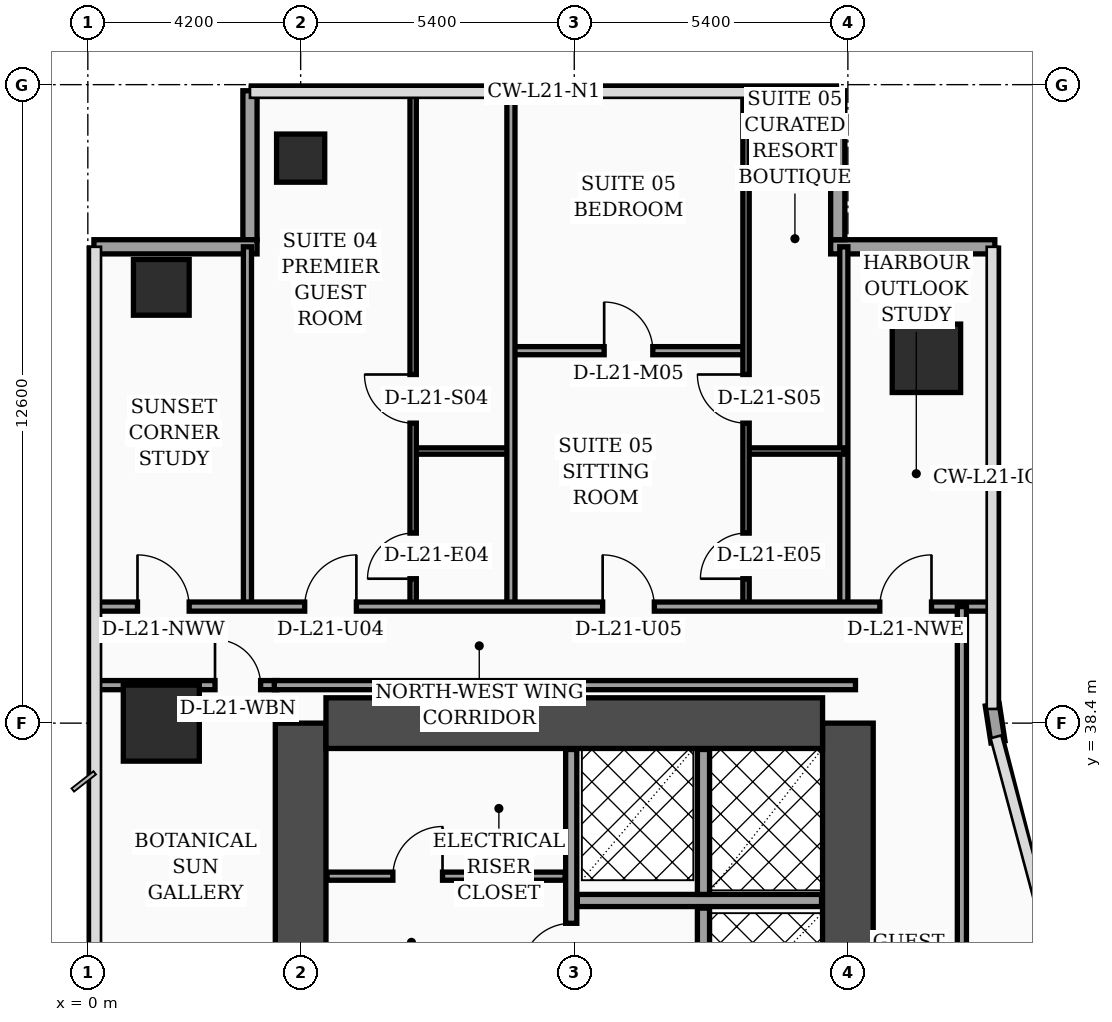
"""IFC4 building model, lengths in metres.
Left out: names, types, materials, properties, quantities, classifications, styles, units other than length and angle.
Written with IfcOpenShell. Run it as: python <this file> out.ifc"""

import sys

from ifc_helpers import new_model, si_unit, direction, frame, frame_2d, origin, origin_2d, place, context, subcontext, project, spatial, rectangle, hollow_rectangle, extrude, element, fill, save


model = new_model("IFC4")
c1 = context("Model", 3, precision=1e-05, world=origin(), true_north=direction((0.0, 1.0)))
c2 = subcontext(c1, "Body", "Model", "MODEL_VIEW")
j1 = project(units=[si_unit("LENGTHUNIT", "METRE"), si_unit("PLANEANGLEUNIT", "RADIAN")], contexts=[c1])
p1 = place(None, origin())
s1 = spatial("IfcSite", under=j1, at=p1, CompositionType="ELEMENT")
p2 = place(p1, origin())
s2 = spatial("IfcBuilding", under=s1, at=p2, CompositionType="ELEMENT")
p3 = place(p2, frame((0.0, 0.0, 88.8)))
s3 = spatial("IfcBuildingStorey", under=s2, at=p3, CompositionType="ELEMENT", Elevation=88.8)
p4 = place(p3, frame((4.2, 16.8, 0.0), z_axis=(0.0, 0.0, 1.0), x_axis=(0.0, 1.0, 0.0)))
e1 = element("IfcWall", 1, at=p4, inside=s3, PredefinedType="SHEAR", context=c2, shape_type="SweptSolid", body=[
    extrude(rectangle(XDim=21.6, YDim=1.0, at=frame_2d((10.8, 0.0))), origin(), (0.0, 0.0, 1.0), 3.52),
])
p5 = place(p3, frame((15.0, 16.8, 0.0), z_axis=(0.0, 0.0, 1.0), x_axis=(0.0, 1.0, 0.0)))
e2 = element("IfcWall", 2, at=p5, inside=s3, PredefinedType="SHEAR", context=c2, shape_type="SweptSolid", body=[
    extrude(rectangle(XDim=21.6, YDim=1.0, at=frame_2d((10.8, 0.0))), origin(), (0.0, 0.0, 1.0), 3.52),
])
p6 = place(p5, frame((8.65, 0.0, 0.0)))
e3 = element("IfcOpeningElement", 3, at=p6, cuts=e2, PredefinedType="OPENING", context=c2, shape_type="SweptSolid", body=[
    extrude(rectangle(XDim=1.1, YDim=2.2, at=frame_2d((0.55, 1.1))), frame((0.0, 0.51, 0.0), z_axis=(0.0, -1.0, 0.0), x_axis=(1.0, 0.0, 0.0)), (0.0, 0.0, 1.0), 1.02),
])
p7 = place(p5, frame((1.25, 0.0, 0.0)))
e4 = element("IfcOpeningElement", 4, at=p7, cuts=e2, PredefinedType="OPENING", context=c2, shape_type="SweptSolid", body=[
    extrude(rectangle(XDim=1.1, YDim=2.2, at=frame_2d((0.55, 1.1))), frame((0.0, 0.51, 0.0), z_axis=(0.0, -1.0, 0.0), x_axis=(1.0, 0.0, 0.0)), (0.0, 0.0, 1.0), 1.02),
])
p8 = place(p5, frame((3.8, 0.0, 0.0)))
e5 = element("IfcOpeningElement", 5, at=p8, cuts=e2, PredefinedType="OPENING", context=c2, shape_type="SweptSolid", body=[
    extrude(rectangle(XDim=1.1, YDim=2.2, at=frame_2d((0.55, 1.1))), frame((0.0, 0.51, 0.0), z_axis=(0.0, -1.0, 0.0), x_axis=(1.0, 0.0, 0.0)), (0.0, 0.0, 1.0), 1.02),
])
p9 = place(p5, frame((6.35, 0.0, 0.0)))
e6 = element("IfcOpeningElement", 6, at=p9, cuts=e2, PredefinedType="OPENING", context=c2, shape_type="SweptSolid", body=[
    extrude(rectangle(XDim=1.1, YDim=2.2, at=frame_2d((0.55, 1.1))), frame((0.0, 0.51, 0.0), z_axis=(0.0, -1.0, 0.0), x_axis=(1.0, 0.0, 0.0)), (0.0, 0.0, 1.0), 1.02),
])
p10 = place(p3, frame((4.7, 38.4, 0.0), z_axis=(0.0, 0.0, 1.0), x_axis=(1.0, 0.0, 0.0)))
e7 = element("IfcWall", 7, at=p10, inside=s3, PredefinedType="SHEAR", context=c2, shape_type="SweptSolid", body=[
    extrude(rectangle(XDim=9.8, YDim=1.0, at=frame_2d((4.9, 0.0))), origin(), (0.0, 0.0, 1.0), 3.52),
])
p11 = place(p3, frame((1.45, 38.4, 0.0), z_axis=(0.0, 0.0, 1.0), x_axis=(1.0, 0.0, 0.0)))
e8 = element("IfcColumn", 8, at=p11, inside=s3, PredefinedType="COLUMN", context=c2, shape_type="SweptSolid", body=[
    extrude(rectangle(XDim=1.5, YDim=1.5, at=origin_2d()), origin(), (0.0, 0.0, 1.0), 3.52),
])
p12 = place(p3, frame((1.45, 47.0, 0.0), z_axis=(0.0, 0.0, 1.0), x_axis=(1.0, 0.0, 0.0)))
e9 = element("IfcColumn", 9, at=p12, inside=s3, PredefinedType="COLUMN", context=c2, shape_type="SweptSolid", body=[
    extrude(hollow_rectangle(XDim=1.1, YDim=1.1, WallThickness=0.045, at=origin_2d()), origin(), (0.0, 0.0, 1.0), 3.52),
])
p13 = place(p3, frame((4.2, 49.55, 0.0), z_axis=(0.0, 0.0, 1.0), x_axis=(1.0, 0.0, 0.0)))
e10 = element("IfcColumn", 10, at=p13, inside=s3, PredefinedType="COLUMN", context=c2, shape_type="SweptSolid", body=[
    extrude(hollow_rectangle(XDim=0.95, YDim=0.95, WallThickness=0.04, at=origin_2d()), origin(), (0.0, 0.0, 1.0), 3.52),
])
p14 = place(p3, frame((16.55, 45.6, 0.0), z_axis=(0.0, 0.0, 1.0), x_axis=(1.0, 0.0, 0.0)))
e11 = element("IfcColumn", 11, at=p14, inside=s3, PredefinedType="COLUMN", context=c2, shape_type="SweptSolid", body=[
    extrude(rectangle(XDim=1.35, YDim=1.35, at=origin_2d()), origin(), (0.0, 0.0, 1.0), 3.52),
])
p15 = place(p3, frame((17.962, 38.03, 0.0), z_axis=(0.0, 0.0, 1.0), x_axis=(-0.15141125477, 0.988470855377, 0.0)))
e12 = element("IfcWall", 12, at=p15, inside=s3, PredefinedType="SOLIDWALL", context=c2, shape_type="SweptSolid", body=[
    extrude(rectangle(XDim=0.739, YDim=0.28, at=frame_2d((0.369, 0.0))), origin(), (0.0, 0.0, 1.0), 3.52),
])
p16 = place(p3, frame((17.9, 47.8, 0.0), z_axis=(0.0, 0.0, 1.0), x_axis=(-1.0, 0.0, 0.0)))
e13 = element("IfcWall", 13, at=p16, inside=s3, PredefinedType="SOLIDWALL", context=c2, shape_type="SweptSolid", body=[
    extrude(rectangle(XDim=3.24, YDim=0.28, at=frame_2d((1.62, 0.0))), origin(), (0.0, 0.0, 1.0), 3.52),
])
p17 = place(p3, frame((14.8, 47.94, 0.0), z_axis=(0.0, 0.0, 1.0), x_axis=(0.0, 1.0, 0.0)))
e14 = element("IfcWall", 14, at=p17, inside=s3, PredefinedType="SOLIDWALL", context=c2, shape_type="SweptSolid", body=[
    extrude(rectangle(XDim=2.94, YDim=0.28, at=frame_2d((1.47, 0.0))), origin(), (0.0, 0.0, 1.0), 3.52),
])
p18 = place(p3, frame((3.2, 50.88, 0.0), z_axis=(0.0, 0.0, 1.0), x_axis=(0.0, -1.0, 0.0)))
e15 = element("IfcWall", 15, at=p18, inside=s3, PredefinedType="SOLIDWALL", context=c2, shape_type="SweptSolid", body=[
    extrude(rectangle(XDim=2.94, YDim=0.28, at=frame_2d((1.47, 0.0))), origin(), (0.0, 0.0, 1.0), 3.02),
])
p19 = place(p3, frame((3.34, 47.8, 0.0), z_axis=(0.0, 0.0, 1.0), x_axis=(-1.0, 0.0, 0.0)))
e16 = element("IfcWall", 16, at=p19, inside=s3, PredefinedType="SOLIDWALL", context=c2, shape_type="SweptSolid", body=[
    extrude(rectangle(XDim=3.22, YDim=0.28, at=frame_2d((1.61, 0.0))), origin(), (0.0, 0.0, 1.0), 3.02),
])
p20 = place(p3, frame((4.72, 35.38, 0.0), z_axis=(0.0, 0.0, 1.0), x_axis=(1.0, 0.0, 0.0)))
e17 = element("IfcWall", 17, at=p20, inside=s3, PredefinedType="PARTITIONING", context=c2, shape_type="SweptSolid", body=[
    extrude(rectangle(XDim=4.7, YDim=0.16, at=frame_2d((2.35, 0.0))), origin(), (0.0, 0.0, 1.0), 3.52),
])
p21 = place(p20, frame((1.3, 0.0, 0.0)))
e18 = element("IfcOpeningElement", 18, at=p21, cuts=e17, PredefinedType="OPENING", context=c2, shape_type="SweptSolid", body=[
    extrude(rectangle(XDim=0.98, YDim=2.15, at=frame_2d((0.49, 1.075))), frame((0.0, 0.09, 0.0), z_axis=(0.0, -1.0, 0.0), x_axis=(1.0, 0.0, 0.0)), (0.0, 0.0, 1.0), 0.18),
])
p22 = place(p3, frame((9.54, 32.92, 0.0), z_axis=(0.0, 0.0, 1.0), x_axis=(0.0, 1.0, 0.0)))
e19 = element("IfcWall", 19, at=p22, inside=s3, PredefinedType="SOLIDWALL", context=c2, shape_type="SweptSolid", body=[
    extrude(rectangle(XDim=4.96, YDim=0.22, at=frame_2d((2.48, 0.0))), origin(), (0.0, 0.0, 1.0), 3.52),
])
p23 = place(p22, frame((0.55, 0.0, 0.0)))
e20 = element("IfcOpeningElement", 20, at=p23, cuts=e19, PredefinedType="OPENING", context=c2, shape_type="SweptSolid", body=[
    extrude(rectangle(XDim=0.98, YDim=2.15, at=frame_2d((0.49, 1.075))), frame((0.0, 0.12, 0.0), z_axis=(0.0, -1.0, 0.0), x_axis=(1.0, 0.0, 0.0)), (0.0, 0.0, 1.0), 0.24),
])
p24 = place(p3, frame((12.15, 27.0, 0.0), z_axis=(0.0, 0.0, 1.0), x_axis=(0.0, 1.0, 0.0)))
e21 = element("IfcWall", 21, at=p24, inside=s3, PredefinedType="SOLIDWALL", context=c2, shape_type="SweptSolid", body=[
    extrude(rectangle(XDim=7.75, YDim=0.24, at=frame_2d((3.875, 0.0))), origin(), (0.0, 0.0, 1.0), 3.52),
])
p25 = place(p3, frame((9.66, 34.9, 0.0), z_axis=(0.0, 0.0, 1.0), x_axis=(1.0, 0.0, 0.0)))
e22 = element("IfcWall", 22, at=p25, inside=s3, PredefinedType="SOLIDWALL", context=c2, shape_type="SweptSolid", body=[
    extrude(rectangle(XDim=4.82, YDim=0.24, at=frame_2d((2.41, 0.0))), origin(), (0.0, 0.0, 1.0), 3.52),
])
p26 = place(p3, frame((12.15, 35.02, 0.0), z_axis=(0.0, 0.0, 1.0), x_axis=(0.0, 1.0, 0.0)))
e23 = element("IfcWall", 23, at=p26, inside=s3, PredefinedType="SOLIDWALL", context=c2, shape_type="SweptSolid", body=[
    extrude(rectangle(XDim=2.86, YDim=0.24, at=frame_2d((1.43, 0.0))), origin(), (0.0, 0.0, 1.0), 3.52),
])
p27 = place(p3, frame((0.08, 39.15, 0.0), z_axis=(0.0, 0.0, 1.0), x_axis=(1.0, 0.0, 0.0)))
e24 = element("IfcWall", 24, at=p27, inside=s3, PredefinedType="PARTITIONING", context=c2, shape_type="SweptSolid", body=[
    extrude(rectangle(XDim=3.65, YDim=0.18, at=frame_2d((1.825, 0.0))), origin(), (0.0, 0.0, 1.0), 2.82),
])
p28 = place(p27, frame((2.43, 0.0, 0.0)))
e25 = element("IfcOpeningElement", 25, at=p28, cuts=e24, PredefinedType="OPENING", context=c2, shape_type="SweptSolid", body=[
    extrude(rectangle(XDim=0.9, YDim=2.15, at=frame_2d((0.45, 1.075))), frame((0.0, 0.1, 0.0), z_axis=(0.0, -1.0, 0.0), x_axis=(1.0, 0.0, 0.0)), (0.0, 0.0, 1.0), 0.2),
])
p29 = place(p3, frame((3.15, 40.7, 0.0), z_axis=(0.0, 0.0, 1.0), x_axis=(0.0, 1.0, 0.0)))
e26 = element("IfcWall", 26, at=p29, inside=s3, PredefinedType="PARTITIONING", context=c2, shape_type="SweptSolid", body=[
    extrude(rectangle(XDim=7.1, YDim=0.16, at=frame_2d((3.55, 0.0))), origin(), (0.0, 0.0, 1.0), 3.12),
])
p30 = place(p3, frame((14.92, 40.7, 0.0), z_axis=(0.0, 0.0, 1.0), x_axis=(0.0, 1.0, 0.0)))
e27 = element("IfcWall", 27, at=p30, inside=s3, PredefinedType="PARTITIONING", context=c2, shape_type="SweptSolid", body=[
    extrude(rectangle(XDim=7.1, YDim=0.16, at=frame_2d((3.55, 0.0))), origin(), (0.0, 0.0, 1.0), 3.02),
])
p31 = place(p3, frame((6.42, 43.77, 0.0), z_axis=(0.0, 0.0, 1.0), x_axis=(1.0, 0.0, 0.0)))
e28 = element("IfcWall", 28, at=p31, inside=s3, PredefinedType="PARTITIONING", context=c2, shape_type="SweptSolid", body=[
    extrude(rectangle(XDim=1.93, YDim=0.125, at=frame_2d((0.965, 0.0))), origin(), (0.0, 0.0, 1.0), 3.52),
])
p32 = place(p3, frame((6.42, 40.7, 0.0), z_axis=(0.0, 0.0, 1.0), x_axis=(0.0, 1.0, 0.0)))
e29 = element("IfcWall", 29, at=p32, inside=s3, PredefinedType="PARTITIONING", context=c2, shape_type="SweptSolid", body=[
    extrude(rectangle(XDim=10.24, YDim=0.125, at=frame_2d((5.12, 0.0))), origin(), (0.0, 0.0, 1.0), 3.02),
])
p33 = place(p32, frame((0.55, 0.0, 0.0)))
e30 = element("IfcOpeningElement", 30, at=p33, cuts=e29, PredefinedType="OPENING", context=c2, shape_type="SweptSolid", body=[
    extrude(rectangle(XDim=0.9, YDim=2.15, at=frame_2d((0.45, 1.075))), frame((0.0, 0.073, 0.0), z_axis=(0.0, -1.0, 0.0), x_axis=(1.0, 0.0, 0.0)), (0.0, 0.0, 1.0), 0.145),
])
p34 = place(p32, frame((3.62, 0.0, 0.0)))
e31 = element("IfcOpeningElement", 31, at=p34, cuts=e29, PredefinedType="OPENING", context=c2, shape_type="SweptSolid", body=[
    extrude(rectangle(XDim=0.96, YDim=2.2, at=frame_2d((0.48, 1.1))), frame((0.0, 0.073, 0.0), z_axis=(0.0, -1.0, 0.0), x_axis=(1.0, 0.0, 0.0)), (0.0, 0.0, 1.0), 0.145),
])
p35 = place(p3, frame((12.99, 43.77, 0.0), z_axis=(0.0, 0.0, 1.0), x_axis=(1.0, 0.0, 0.0)))
e32 = element("IfcWall", 32, at=p35, inside=s3, PredefinedType="PARTITIONING", context=c2, shape_type="SweptSolid", body=[
    extrude(rectangle(XDim=1.93, YDim=0.125, at=frame_2d((0.965, 0.0))), origin(), (0.0, 0.0, 1.0), 3.52),
])
p36 = place(p3, frame((8.35, 45.75, 0.0), z_axis=(0.0, 0.0, 1.0), x_axis=(1.0, 0.0, 0.0)))
e33 = element("IfcWall", 33, at=p36, inside=s3, PredefinedType="PARTITIONING", context=c2, shape_type="SweptSolid", body=[
    extrude(rectangle(XDim=4.64, YDim=0.16, at=frame_2d((2.32, 0.0))), origin(), (0.0, 0.0, 1.0), 3.52),
])
p37 = place(p36, frame((1.84, 0.0, 0.0)))
e34 = element("IfcOpeningElement", 34, at=p37, cuts=e33, PredefinedType="OPENING", context=c2, shape_type="SweptSolid", body=[
    extrude(rectangle(XDim=0.96, YDim=2.2, at=frame_2d((0.48, 1.1))), frame((0.0, 0.09, 0.0), z_axis=(0.0, -1.0, 0.0), x_axis=(1.0, 0.0, 0.0)), (0.0, 0.0, 1.0), 0.18),
])
p38 = place(p3, frame((12.99, 40.7, 0.0), z_axis=(0.0, 0.0, 1.0), x_axis=(0.0, 1.0, 0.0)))
e35 = element("IfcWall", 35, at=p38, inside=s3, PredefinedType="PARTITIONING", context=c2, shape_type="SweptSolid", body=[
    extrude(rectangle(XDim=10.24, YDim=0.125, at=frame_2d((5.12, 0.0))), origin(), (0.0, 0.0, 1.0), 3.02),
])
p39 = place(p38, frame((0.55, 0.0, 0.0)))
e36 = element("IfcOpeningElement", 36, at=p39, cuts=e35, PredefinedType="OPENING", context=c2, shape_type="SweptSolid", body=[
    extrude(rectangle(XDim=0.9, YDim=2.15, at=frame_2d((0.45, 1.075))), frame((0.0, 0.073, 0.0), z_axis=(0.0, -1.0, 0.0), x_axis=(1.0, 0.0, 0.0)), (0.0, 0.0, 1.0), 0.145),
])
p40 = place(p38, frame((3.62, 0.0, 0.0)))
e37 = element("IfcOpeningElement", 37, at=p40, cuts=e35, PredefinedType="OPENING", context=c2, shape_type="SweptSolid", body=[
    extrude(rectangle(XDim=0.96, YDim=2.2, at=frame_2d((0.48, 1.1))), frame((0.0, 0.073, 0.0), z_axis=(0.0, -1.0, 0.0), x_axis=(1.0, 0.0, 0.0)), (0.0, 0.0, 1.0), 0.145),
])
p41 = place(p3, frame((8.35, 40.7, 0.0), z_axis=(0.0, 0.0, 1.0), x_axis=(0.0, 1.0, 0.0)))
e38 = element("IfcWall", 38, at=p41, inside=s3, PredefinedType="PARTITIONING", context=c2, shape_type="SweptSolid", body=[
    extrude(rectangle(XDim=10.24, YDim=0.16, at=frame_2d((5.12, 0.0))), origin(), (0.0, 0.0, 1.0), 3.02),
])
p42 = place(p3, frame((0.08, 40.7, 0.0), z_axis=(0.0, 0.0, 1.0), x_axis=(1.0, 0.0, 0.0)))
e39 = element("IfcWall", 39, at=p42, inside=s3, PredefinedType="PARTITIONING", context=c2, shape_type="SweptSolid", body=[
    extrude(rectangle(XDim=17.77, YDim=0.18, at=frame_2d((8.885, 0.0))), origin(), (0.0, 0.0, 1.0), 2.82),
])
p43 = place(p42, frame((0.9, 0.0, 0.0)))
e40 = element("IfcOpeningElement", 40, at=p43, cuts=e39, PredefinedType="OPENING", context=c2, shape_type="SweptSolid", body=[
    extrude(rectangle(XDim=1.02, YDim=2.2, at=frame_2d((0.51, 1.1))), frame((0.0, 0.1, 0.0), z_axis=(0.0, -1.0, 0.0), x_axis=(1.0, 0.0, 0.0)), (0.0, 0.0, 1.0), 0.2),
])
p44 = place(p42, frame((4.2, 0.0, 0.0)))
e41 = element("IfcOpeningElement", 41, at=p44, cuts=e39, PredefinedType="OPENING", context=c2, shape_type="SweptSolid", body=[
    extrude(rectangle(XDim=1.02, YDim=2.2, at=frame_2d((0.51, 1.1))), frame((0.0, 0.1, 0.0), z_axis=(0.0, -1.0, 0.0), x_axis=(1.0, 0.0, 0.0)), (0.0, 0.0, 1.0), 0.2),
])
p45 = place(p42, frame((10.08, 0.0, 0.0)))
e42 = element("IfcOpeningElement", 42, at=p45, cuts=e39, PredefinedType="OPENING", context=c2, shape_type="SweptSolid", body=[
    extrude(rectangle(XDim=1.02, YDim=2.2, at=frame_2d((0.51, 1.1))), frame((0.0, 0.1, 0.0), z_axis=(0.0, -1.0, 0.0), x_axis=(1.0, 0.0, 0.0)), (0.0, 0.0, 1.0), 0.2),
])
p46 = place(p42, frame((15.55, 0.0, 0.0)))
e43 = element("IfcOpeningElement", 43, at=p46, cuts=e39, PredefinedType="OPENING", context=c2, shape_type="SweptSolid", body=[
    extrude(rectangle(XDim=1.02, YDim=2.2, at=frame_2d((0.51, 1.1))), frame((0.0, 0.1, 0.0), z_axis=(0.0, -1.0, 0.0), x_axis=(1.0, 0.0, 0.0)), (0.0, 0.0, 1.0), 0.2),
])
p47 = place(p3, frame((17.25, 24.3, 0.0), z_axis=(0.0, 0.0, 1.0), x_axis=(0.0, 1.0, 0.0)))
e44 = element("IfcWall", 44, at=p47, inside=s3, PredefinedType="PARTITIONING", context=c2, shape_type="SweptSolid", body=[
    extrude(rectangle(XDim=16.4, YDim=0.18, at=frame_2d((8.2, 0.0))), origin(), (0.0, 0.0, 1.0), 2.82),
])
p48 = place(p3, frame((3.68, 39.15, 0.0), z_axis=(0.0, 0.0, 1.0), x_axis=(1.0, 0.0, 0.0)))
e45 = element("IfcWall", 45, at=p48, inside=s3, PredefinedType="PARTITIONING", context=c2, shape_type="SweptSolid", body=[
    extrude(rectangle(XDim=11.47, YDim=0.18, at=frame_2d((5.735, 0.0))), origin(), (0.0, 0.0, 1.0), 2.82),
])
p49 = place(p21, origin())
e46 = element("IfcDoor", 46, at=p49, inside=s3, OperationType="SINGLE_SWING_RIGHT", PredefinedType="DOOR", context=c2, shape_type="SweptSolid", body=[
    extrude(rectangle(XDim=0.98, YDim=2.15, at=frame_2d((0.49, 1.075))), frame((0.0, 0.025, 0.0), z_axis=(0.0, -1.0, 0.0), x_axis=(1.0, 0.0, 0.0)), (0.0, 0.0, 1.0), 0.05),
])
fill(e18, e46)
p50 = place(p23, origin())
e47 = element("IfcDoor", 47, at=p50, inside=s3, OperationType="SINGLE_SWING_LEFT", PredefinedType="DOOR", context=c2, shape_type="SweptSolid", body=[
    extrude(rectangle(XDim=0.98, YDim=2.15, at=frame_2d((0.49, 1.075))), frame((0.0, 0.025, 0.0), z_axis=(0.0, -1.0, 0.0), x_axis=(1.0, 0.0, 0.0)), (0.0, 0.0, 1.0), 0.05),
])
fill(e20, e47)
p51 = place(p28, origin())
e48 = element("IfcDoor", 48, at=p51, inside=s3, OperationType="SINGLE_SWING_LEFT", PredefinedType="DOOR", context=c2, shape_type="SweptSolid", body=[
    extrude(rectangle(XDim=0.9, YDim=2.15, at=frame_2d((0.45, 1.075))), frame((0.0, 0.025, 0.0), z_axis=(0.0, -1.0, 0.0), x_axis=(1.0, 0.0, 0.0)), (0.0, 0.0, 1.0), 0.05),
])
fill(e25, e48)
p52 = place(p33, origin())
e49 = element("IfcDoor", 49, at=p52, inside=s3, OperationType="SINGLE_SWING_LEFT", PredefinedType="DOOR", context=c2, shape_type="SweptSolid", body=[
    extrude(rectangle(XDim=0.9, YDim=2.15, at=frame_2d((0.45, 1.075))), frame((0.0, 0.025, 0.0), z_axis=(0.0, -1.0, 0.0), x_axis=(1.0, 0.0, 0.0)), (0.0, 0.0, 1.0), 0.05),
])
fill(e30, e49)
p53 = place(p34, origin())
e50 = element("IfcDoor", 50, at=p53, inside=s3, OperationType="SINGLE_SWING_RIGHT", PredefinedType="DOOR", context=c2, shape_type="SweptSolid", body=[
    extrude(rectangle(XDim=0.96, YDim=2.2, at=frame_2d((0.48, 1.1))), frame((0.0, 0.025, 0.0), z_axis=(0.0, -1.0, 0.0), x_axis=(1.0, 0.0, 0.0)), (0.0, 0.0, 1.0), 0.05),
])
fill(e31, e50)
p54 = place(p37, origin())
e51 = element("IfcDoor", 51, at=p54, inside=s3, OperationType="SINGLE_SWING_LEFT", PredefinedType="DOOR", context=c2, shape_type="SweptSolid", body=[
    extrude(rectangle(XDim=0.96, YDim=2.2, at=frame_2d((0.48, 1.1))), frame((0.0, 0.025, 0.0), z_axis=(0.0, -1.0, 0.0), x_axis=(1.0, 0.0, 0.0)), (0.0, 0.0, 1.0), 0.05),
])
fill(e34, e51)
p55 = place(p39, origin())
e52 = element("IfcDoor", 52, at=p55, inside=s3, OperationType="SINGLE_SWING_LEFT", PredefinedType="DOOR", context=c2, shape_type="SweptSolid", body=[
    extrude(rectangle(XDim=0.9, YDim=2.15, at=frame_2d((0.45, 1.075))), frame((0.0, 0.025, 0.0), z_axis=(0.0, -1.0, 0.0), x_axis=(1.0, 0.0, 0.0)), (0.0, 0.0, 1.0), 0.05),
])
fill(e36, e52)
p56 = place(p40, origin())
e53 = element("IfcDoor", 53, at=p56, inside=s3, OperationType="SINGLE_SWING_RIGHT", PredefinedType="DOOR", context=c2, shape_type="SweptSolid", body=[
    extrude(rectangle(XDim=0.96, YDim=2.2, at=frame_2d((0.48, 1.1))), frame((0.0, 0.025, 0.0), z_axis=(0.0, -1.0, 0.0), x_axis=(1.0, 0.0, 0.0)), (0.0, 0.0, 1.0), 0.05),
])
fill(e37, e53)
p57 = place(p43, origin())
e54 = element("IfcDoor", 54, at=p57, inside=s3, OperationType="SINGLE_SWING_LEFT", PredefinedType="DOOR", context=c2, shape_type="SweptSolid", body=[
    extrude(rectangle(XDim=1.02, YDim=2.2, at=frame_2d((0.51, 1.1))), frame((0.0, 0.025, 0.0), z_axis=(0.0, -1.0, 0.0), x_axis=(1.0, 0.0, 0.0)), (0.0, 0.0, 1.0), 0.05),
])
fill(e40, e54)
p58 = place(p44, origin())
e55 = element("IfcDoor", 55, at=p58, inside=s3, OperationType="SINGLE_SWING_RIGHT", PredefinedType="DOOR", context=c2, shape_type="SweptSolid", body=[
    extrude(rectangle(XDim=1.02, YDim=2.2, at=frame_2d((0.51, 1.1))), frame((0.0, 0.025, 0.0), z_axis=(0.0, -1.0, 0.0), x_axis=(1.0, 0.0, 0.0)), (0.0, 0.0, 1.0), 0.05),
])
fill(e41, e55)
p59 = place(p45, origin())
e56 = element("IfcDoor", 56, at=p59, inside=s3, OperationType="SINGLE_SWING_LEFT", PredefinedType="DOOR", context=c2, shape_type="SweptSolid", body=[
    extrude(rectangle(XDim=1.02, YDim=2.2, at=frame_2d((0.51, 1.1))), frame((0.0, 0.025, 0.0), z_axis=(0.0, -1.0, 0.0), x_axis=(1.0, 0.0, 0.0)), (0.0, 0.0, 1.0), 0.05),
])
fill(e42, e56)
p60 = place(p46, origin())
e57 = element("IfcDoor", 57, at=p60, inside=s3, OperationType="SINGLE_SWING_RIGHT", PredefinedType="DOOR", context=c2, shape_type="SweptSolid", body=[
    extrude(rectangle(XDim=1.02, YDim=2.2, at=frame_2d((0.51, 1.1))), frame((0.0, 0.025, 0.0), z_axis=(0.0, -1.0, 0.0), x_axis=(1.0, 0.0, 0.0)), (0.0, 0.0, 1.0), 0.05),
])
fill(e43, e57)
save(model, sys.argv[1])
